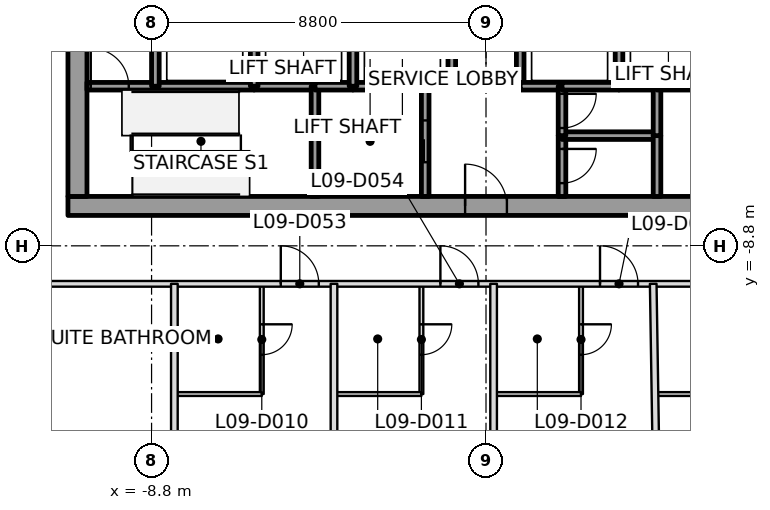
"""IFC4 building model, lengths in metres.
Left out: names, types, materials, properties, quantities, classifications, styles, units other than length and angle.
Written with IfcOpenShell. Run it as: python <this file> out.ifc"""

import sys

from ifc_helpers import new_model, si_unit, direction, frame, frame_2d, origin, place, context, subcontext, project, spatial, rectangle, extrude, element, fill, save


model = new_model("IFC4")
c1 = context("Model", 3, precision=1e-05, world=origin(), true_north=direction((0.0, 1.0)))
c2 = subcontext(c1, "Body", "Model", "MODEL_VIEW")
j1 = project(units=[si_unit("LENGTHUNIT", "METRE"), si_unit("PLANEANGLEUNIT", "RADIAN")], contexts=[c1])
p1 = place(None, origin())
s1 = spatial("IfcSite", under=j1, at=p1, CompositionType="ELEMENT")
p2 = place(p1, origin())
s2 = spatial("IfcBuilding", under=s1, at=p2, CompositionType="ELEMENT")
p3 = place(p2, frame((0.0, 0.0, 55.4)))
s3 = spatial("IfcBuildingStorey", under=s2, at=p3, CompositionType="ELEMENT", Elevation=55.4)
p4 = place(p3, frame((-11.0, -7.75, 0.0), z_axis=(0.0, 0.0, 1.0), x_axis=(1.0, 0.0, 0.0)))
e1 = element("IfcWall", 1, at=p4, inside=s3, PredefinedType="SHEAR", context=c2, shape_type="SweptSolid", body=[
    extrude(rectangle(XDim=22.0, YDim=0.5, at=frame_2d((11.0, 0.0))), origin(), (0.0, 0.0, 1.0), 3.7),
])
p5 = place(p4, frame((10.45, 0.0, 0.0)))
e2 = element("IfcOpeningElement", 2, at=p5, cuts=e1, PredefinedType="OPENING", context=c2, shape_type="SweptSolid", body=[
    extrude(rectangle(XDim=1.1, YDim=2.1, at=frame_2d((0.55, 1.05))), frame((0.0, 0.25, 0.0), z_axis=(0.0, -1.0, 0.0), x_axis=(1.0, 0.0, 0.0)), (0.0, 0.0, 1.0), 0.5),
])
p6 = place(p3, frame((-10.75, -7.5, 0.0), z_axis=(0.0, 0.0, 1.0), x_axis=(0.0, 1.0, 0.0)))
e3 = element("IfcWall", 3, at=p6, inside=s3, PredefinedType="SHEAR", context=c2, shape_type="SweptSolid", body=[
    extrude(rectangle(XDim=15.0, YDim=0.5, at=frame_2d((7.5, 0.0))), origin(), (0.0, 0.0, 1.0), 3.7),
])
p7 = place(p6, frame((6.6, 0.0, 0.0)))
e4 = element("IfcOpeningElement", 4, at=p7, cuts=e3, PredefinedType="OPENING", context=c2, shape_type="SweptSolid", body=[
    extrude(rectangle(XDim=1.8, YDim=2.1, at=frame_2d((0.9, 1.05))), frame((0.0, 0.25, 0.0), z_axis=(0.0, -1.0, 0.0), x_axis=(1.0, 0.0, 0.0)), (0.0, 0.0, 1.0), 0.5),
])
p8 = place(p3, frame((-10.5, -4.6, 0.0), z_axis=(0.0, 0.0, 1.0), x_axis=(1.0, 0.0, 0.0)))
e5 = element("IfcWall", 5, at=p8, inside=s3, PredefinedType="SOLIDWALL", context=c2, shape_type="SweptSolid", body=[
    extrude(rectangle(XDim=1.8, YDim=0.2, at=frame_2d((0.9, 0.0))), origin(), (0.0, 0.0, 1.0), 3.55),
])
p9 = place(p8, frame((0.1, 0.0, 0.0)))
e6 = element("IfcOpeningElement", 6, at=p9, cuts=e5, PredefinedType="OPENING", context=c2, shape_type="SweptSolid", body=[
    extrude(rectangle(XDim=1.0, YDim=2.1, at=frame_2d((0.5, 1.05))), frame((0.0, 0.1, 0.0), z_axis=(0.0, -1.0, 0.0), x_axis=(1.0, 0.0, 0.0)), (0.0, 0.0, 1.0), 0.2),
])
p10 = place(p3, frame((-8.7, -4.6, 0.0), z_axis=(0.0, 0.0, 1.0), x_axis=(1.0, 0.0, 0.0)))
e7 = element("IfcWall", 7, at=p10, inside=s3, PredefinedType="SOLIDWALL", context=c2, shape_type="SweptSolid", body=[
    extrude(rectangle(XDim=2.6, YDim=0.2, at=frame_2d((1.3, 0.0))), origin(), (0.0, 0.0, 1.0), 3.55),
])
p11 = place(p3, frame((-8.7, -4.6, 0.0), z_axis=(0.0, 0.0, 1.0), x_axis=(0.0, 1.0, 0.0)))
e8 = element("IfcWall", 8, at=p11, inside=s3, PredefinedType="SOLIDWALL", context=c2, shape_type="SweptSolid", body=[
    extrude(rectangle(XDim=2.8, YDim=0.2, at=frame_2d((1.4, 0.0))), origin(), (0.0, 0.0, 1.0), 3.55),
])
p12 = place(p3, frame((-6.1, -4.6, 0.0), z_axis=(0.0, 0.0, 1.0), x_axis=(1.0, 0.0, 0.0)))
e9 = element("IfcWall", 9, at=p12, inside=s3, PredefinedType="SOLIDWALL", context=c2, shape_type="SweptSolid", body=[
    extrude(rectangle(XDim=1.6, YDim=0.2, at=frame_2d((0.8, 0.0))), origin(), (0.0, 0.0, 1.0), 3.55),
])
p13 = place(p3, frame((-6.1, -4.6, 0.0), z_axis=(0.0, 0.0, 1.0), x_axis=(0.0, 1.0, 0.0)))
e10 = element("IfcWall", 10, at=p13, inside=s3, PredefinedType="SOLIDWALL", context=c2, shape_type="SweptSolid", body=[
    extrude(rectangle(XDim=2.8, YDim=0.2, at=frame_2d((1.4, 0.0))), origin(), (0.0, 0.0, 1.0), 3.55),
])
p14 = place(p3, frame((-4.5, -4.6, 0.0), z_axis=(0.0, 0.0, 1.0), x_axis=(0.0, -1.0, 0.0)))
e11 = element("IfcWall", 11, at=p14, inside=s3, PredefinedType="SOLIDWALL", context=c2, shape_type="SweptSolid", body=[
    extrude(rectangle(XDim=2.9, YDim=0.2, at=frame_2d((1.45, 0.0))), origin(), (0.0, 0.0, 1.0), 3.55),
])
p15 = place(p3, frame((-4.5, -4.6, 0.0), z_axis=(0.0, 0.0, 1.0), x_axis=(1.0, 0.0, 0.0)))
e12 = element("IfcWall", 12, at=p15, inside=s3, PredefinedType="SOLIDWALL", context=c2, shape_type="SweptSolid", body=[
    extrude(rectangle(XDim=1.0, YDim=0.2, at=frame_2d((0.5, 0.0))), origin(), (0.0, 0.0, 1.0), 3.55),
])
p16 = place(p3, frame((-3.5, -4.6, 0.0), z_axis=(0.0, 0.0, 1.0), x_axis=(1.0, 0.0, 0.0)))
e13 = element("IfcWall", 13, at=p16, inside=s3, PredefinedType="SOLIDWALL", context=c2, shape_type="SweptSolid", body=[
    extrude(rectangle(XDim=1.9, YDim=0.2, at=frame_2d((0.95, 0.0))), origin(), (0.0, 0.0, 1.0), 3.55),
])
p17 = place(p3, frame((-3.5, -4.6, 0.0), z_axis=(0.0, 0.0, 1.0), x_axis=(0.0, 1.0, 0.0)))
e14 = element("IfcWall", 14, at=p17, inside=s3, PredefinedType="SOLIDWALL", context=c2, shape_type="SweptSolid", body=[
    extrude(rectangle(XDim=2.8, YDim=0.2, at=frame_2d((1.4, 0.0))), origin(), (0.0, 0.0, 1.0), 3.55),
])
p18 = place(p3, frame((-1.6, -7.5, 0.0), z_axis=(0.0, 0.0, 1.0), x_axis=(0.0, 1.0, 0.0)))
e15 = element("IfcWall", 15, at=p18, inside=s3, PredefinedType="SOLIDWALL", context=c2, shape_type="SweptSolid", body=[
    extrude(rectangle(XDim=2.9, YDim=0.2, at=frame_2d((1.45, 0.0))), origin(), (0.0, 0.0, 1.0), 3.55),
])
p19 = place(p18, frame((0.9, 0.0, 0.0)))
e16 = element("IfcOpeningElement", 16, at=p19, cuts=e15, PredefinedType="OPENING", context=c2, shape_type="SweptSolid", body=[
    extrude(rectangle(XDim=1.1, YDim=2.1, at=frame_2d((0.55, 1.05))), frame((0.0, 0.1, 0.0), z_axis=(0.0, -1.0, 0.0), x_axis=(1.0, 0.0, 0.0)), (0.0, 0.0, 1.0), 0.2),
])
p20 = place(p3, frame((-1.6, -4.6, 0.0), z_axis=(0.0, 0.0, 1.0), x_axis=(1.0, 0.0, 0.0)))
e17 = element("IfcWall", 17, at=p20, inside=s3, PredefinedType="SOLIDWALL", context=c2, shape_type="SweptSolid", body=[
    extrude(rectangle(XDim=0.7, YDim=0.2, at=frame_2d((0.35, 0.0))), origin(), (0.0, 0.0, 1.0), 3.55),
])
for number, where, z_axis, x_axis in (
    (18, (-0.9, -4.6, 0.0), (0.0, 0.0, 1.0), (0.0, 1.0, 0.0)),
    (19, (0.9, -1.8, 0.0), (0.0, 0.0, 1.0), (0.0, -1.0, 0.0)),
):
    element("IfcWall", number, at=place(p3, frame(where, z_axis=z_axis, x_axis=x_axis)), inside=s3, PredefinedType="SOLIDWALL", context=c2, shape_type="SweptSolid", body=[
        extrude(rectangle(XDim=2.8, YDim=0.2, at=frame_2d((1.4, 0.0))), origin(), (0.0, 0.0, 1.0), 3.55),
    ])
p21 = place(p3, frame((0.9, -4.6, 0.0), z_axis=(0.0, 0.0, 1.0), x_axis=(1.0, 0.0, 0.0)))
e20 = element("IfcWall", 20, at=p21, inside=s3, PredefinedType="SOLIDWALL", context=c2, shape_type="SweptSolid", body=[
    extrude(rectangle(XDim=1.1, YDim=0.2, at=frame_2d((0.55, 0.0))), origin(), (0.0, 0.0, 1.0), 3.55),
])
p22 = place(p3, frame((2.0, -5.9, 0.0), z_axis=(0.0, 0.0, 1.0), x_axis=(0.0, -1.0, 0.0)))
e21 = element("IfcWall", 21, at=p22, inside=s3, PredefinedType="SOLIDWALL", context=c2, shape_type="SweptSolid", body=[
    extrude(rectangle(XDim=1.6, YDim=0.2, at=frame_2d((0.8, 0.0))), origin(), (0.0, 0.0, 1.0), 3.55),
])
p23 = place(p22, frame((0.35, 0.0, 0.0)))
e22 = element("IfcOpeningElement", 22, at=p23, cuts=e21, PredefinedType="OPENING", context=c2, shape_type="SweptSolid", body=[
    extrude(rectangle(XDim=0.9, YDim=2.1, at=frame_2d((0.45, 1.05))), frame((0.0, 0.1, 0.0), z_axis=(0.0, -1.0, 0.0), x_axis=(1.0, 0.0, 0.0)), (0.0, 0.0, 1.0), 0.2),
])
p24 = place(p3, frame((4.5, -5.9, 0.0), z_axis=(0.0, 0.0, 1.0), x_axis=(-1.0, 0.0, 0.0)))
e23 = element("IfcWall", 23, at=p24, inside=s3, PredefinedType="SOLIDWALL", context=c2, shape_type="SweptSolid", body=[
    extrude(rectangle(XDim=2.5, YDim=0.2, at=frame_2d((1.25, 0.0))), origin(), (0.0, 0.0, 1.0), 3.55),
])
p25 = place(p3, frame((2.0, -4.6, 0.0), z_axis=(0.0, 0.0, 1.0), x_axis=(0.0, -1.0, 0.0)))
e24 = element("IfcWall", 24, at=p25, inside=s3, PredefinedType="SOLIDWALL", context=c2, shape_type="SweptSolid", body=[
    extrude(rectangle(XDim=1.3, YDim=0.2, at=frame_2d((0.65, 0.0))), origin(), (0.0, 0.0, 1.0), 3.55),
])
p26 = place(p25, frame((0.2, 0.0, 0.0)))
e25 = element("IfcOpeningElement", 25, at=p26, cuts=e24, PredefinedType="OPENING", context=c2, shape_type="SweptSolid", body=[
    extrude(rectangle(XDim=0.9, YDim=2.1, at=frame_2d((0.45, 1.05))), frame((0.0, 0.1, 0.0), z_axis=(0.0, -1.0, 0.0), x_axis=(1.0, 0.0, 0.0)), (0.0, 0.0, 1.0), 0.2),
])
p27 = place(p3, frame((3.5, -4.6, 0.0), z_axis=(0.0, 0.0, 1.0), x_axis=(-1.0, 0.0, 0.0)))
e26 = element("IfcWall", 26, at=p27, inside=s3, PredefinedType="SOLIDWALL", context=c2, shape_type="SweptSolid", body=[
    extrude(rectangle(XDim=1.5, YDim=0.2, at=frame_2d((0.75, 0.0))), origin(), (0.0, 0.0, 1.0), 3.55),
])
p28 = place(p3, frame((4.5, -4.6, 0.0), z_axis=(0.0, 0.0, 1.0), x_axis=(-1.0, 0.0, 0.0)))
e27 = element("IfcWall", 27, at=p28, inside=s3, PredefinedType="SOLIDWALL", context=c2, shape_type="SweptSolid", body=[
    extrude(rectangle(XDim=1.0, YDim=0.2, at=frame_2d((0.5, 0.0))), origin(), (0.0, 0.0, 1.0), 3.55),
])
p29 = place(p3, frame((3.5, -4.6, 0.0), z_axis=(0.0, 0.0, 1.0), x_axis=(0.0, 1.0, 0.0)))
e28 = element("IfcWall", 28, at=p29, inside=s3, PredefinedType="SOLIDWALL", context=c2, shape_type="SweptSolid", body=[
    extrude(rectangle(XDim=2.8, YDim=0.2, at=frame_2d((1.4, 0.0))), origin(), (0.0, 0.0, 1.0), 3.55),
])
p30 = place(p3, frame((4.5, -7.5, 0.0), z_axis=(0.0, 0.0, 1.0), x_axis=(0.0, 1.0, 0.0)))
e29 = element("IfcWall", 29, at=p30, inside=s3, PredefinedType="SOLIDWALL", context=c2, shape_type="SweptSolid", body=[
    extrude(rectangle(XDim=1.6, YDim=0.2, at=frame_2d((0.8, 0.0))), origin(), (0.0, 0.0, 1.0), 3.55),
])
p31 = place(p3, frame((4.5, -5.9, 0.0), z_axis=(0.0, 0.0, 1.0), x_axis=(0.0, 1.0, 0.0)))
e30 = element("IfcWall", 30, at=p31, inside=s3, PredefinedType="SOLIDWALL", context=c2, shape_type="SweptSolid", body=[
    extrude(rectangle(XDim=1.3, YDim=0.2, at=frame_2d((0.65, 0.0))), origin(), (0.0, 0.0, 1.0), 3.55),
])
p32 = place(p3, frame((4.5, -4.6, 0.0), z_axis=(0.0, 0.0, 1.0), x_axis=(1.0, 0.0, 0.0)))
e31 = element("IfcWall", 31, at=p32, inside=s3, PredefinedType="SOLIDWALL", context=c2, shape_type="SweptSolid", body=[
    extrude(rectangle(XDim=1.6, YDim=0.2, at=frame_2d((0.8, 0.0))), origin(), (0.0, 0.0, 1.0), 3.55),
])
p33 = place(p3, frame((-8.2, -9.8, 0.0), z_axis=(0.0, 0.0, 1.0), x_axis=(0.0, -1.0, 0.0)))
e32 = element("IfcWall", 32, at=p33, inside=s3, PredefinedType="PARTITIONING", context=c2, shape_type="SweptSolid", body=[
    extrude(rectangle(XDim=14.997, YDim=0.175, at=frame_2d((7.498, 0.0))), origin(), (0.0, 0.0, 1.0), 3.0),
])
p34 = place(p3, frame((-4.0, -9.8, 0.0), z_axis=(0.0, 0.0, 1.0), x_axis=(0.0, -1.0, 0.0)))
e33 = element("IfcWall", 33, at=p34, inside=s3, PredefinedType="PARTITIONING", context=c2, shape_type="SweptSolid", body=[
    extrude(rectangle(XDim=17.715, YDim=0.175, at=frame_2d((8.857, 0.0))), origin(), (0.0, 0.0, 1.0), 2.784),
])
p35 = place(p3, frame((0.2, -9.8, 0.0), z_axis=(0.0, 0.0, 1.0), x_axis=(0.0, -1.0, 0.0)))
e34 = element("IfcWall", 34, at=p35, inside=s3, PredefinedType="PARTITIONING", context=c2, shape_type="SweptSolid", body=[
    extrude(rectangle(XDim=17.828, YDim=0.175, at=frame_2d((8.914, 0.0))), origin(), (0.0, 0.0, 1.0), 3.0),
])
p36 = place(p3, frame((4.4, -9.8, 0.0), z_axis=(0.0, 0.0, 1.0), x_axis=(0.015892742746, -0.999873702388, 0.0)))
e35 = element("IfcWall", 35, at=p36, inside=s3, PredefinedType="PARTITIONING", context=c2, shape_type="SweptSolid", body=[
    extrude(rectangle(XDim=17.297, YDim=0.175, at=frame_2d((8.649, 0.0))), origin(), (0.0, 0.0, 1.0), 2.934),
])
p37 = place(p3, frame((-12.72, -9.8, 0.0), z_axis=(0.0, 0.0, 1.0), x_axis=(1.0, 0.0, 0.0)))
e36 = element("IfcWall", 36, at=p37, inside=s3, PredefinedType="PARTITIONING", context=c2, shape_type="SweptSolid", body=[
    extrude(rectangle(XDim=25.44, YDim=0.15, at=frame_2d((12.72, 0.0))), origin(), (0.0, 0.0, 1.0), 2.797),
])
p38 = place(p37, frame((7.32, 0.0, 0.0)))
e37 = element("IfcOpeningElement", 37, at=p38, cuts=e36, PredefinedType="OPENING", context=c2, shape_type="SweptSolid", body=[
    extrude(rectangle(XDim=1.0, YDim=2.1, at=frame_2d((0.5, 1.05))), frame((0.0, 0.075, 0.0), z_axis=(0.0, -1.0, 0.0), x_axis=(1.0, 0.0, 0.0)), (0.0, 0.0, 1.0), 0.15),
])
p39 = place(p37, frame((11.52, 0.0, 0.0)))
e38 = element("IfcOpeningElement", 38, at=p39, cuts=e36, PredefinedType="OPENING", context=c2, shape_type="SweptSolid", body=[
    extrude(rectangle(XDim=1.0, YDim=2.1, at=frame_2d((0.5, 1.05))), frame((0.0, 0.075, 0.0), z_axis=(0.0, -1.0, 0.0), x_axis=(1.0, 0.0, 0.0)), (0.0, 0.0, 1.0), 0.15),
])
p40 = place(p37, frame((15.72, 0.0, 0.0)))
e39 = element("IfcOpeningElement", 39, at=p40, cuts=e36, PredefinedType="OPENING", context=c2, shape_type="SweptSolid", body=[
    extrude(rectangle(XDim=1.0, YDim=2.1, at=frame_2d((0.5, 1.05))), frame((0.0, 0.075, 0.0), z_axis=(0.0, -1.0, 0.0), x_axis=(1.0, 0.0, 0.0)), (0.0, 0.0, 1.0), 0.15),
])
p41 = place(p37, frame((19.92, 0.0, 0.0)))
e40 = element("IfcOpeningElement", 40, at=p41, cuts=e36, PredefinedType="OPENING", context=c2, shape_type="SweptSolid", body=[
    extrude(rectangle(XDim=1.0, YDim=2.1, at=frame_2d((0.5, 1.05))), frame((0.0, 0.075, 0.0), z_axis=(0.0, -1.0, 0.0), x_axis=(1.0, 0.0, 0.0)), (0.0, 0.0, 1.0), 0.15),
])
p42 = place(p3, frame((-5.9, -9.83, 0.0), z_axis=(0.0, 0.0, 1.0), x_axis=(0.0, -1.0, 0.0)))
e41 = element("IfcWall", 41, at=p42, inside=s3, PredefinedType="PARTITIONING", context=c2, shape_type="SweptSolid", body=[
    extrude(rectangle(XDim=2.87, YDim=0.1, at=frame_2d((1.435, 0.0))), origin(), (0.0, 0.0, 1.0), 3.0),
])
p43 = place(p42, frame((1.035, 0.0, 0.0)))
e42 = element("IfcOpeningElement", 42, at=p43, cuts=e41, PredefinedType="OPENING", context=c2, shape_type="SweptSolid", body=[
    extrude(rectangle(XDim=0.8, YDim=2.1, at=frame_2d((0.4, 1.05))), frame((0.0, 0.05, 0.0), z_axis=(0.0, -1.0, 0.0), x_axis=(1.0, 0.0, 0.0)), (0.0, 0.0, 1.0), 0.1),
])
p44 = place(p3, frame((-5.9, -12.7, 0.0), z_axis=(0.0, 0.0, 1.0), x_axis=(-1.0, 0.0, 0.0)))
e43 = element("IfcWall", 43, at=p44, inside=s3, PredefinedType="PARTITIONING", context=c2, shape_type="SweptSolid", body=[
    extrude(rectangle(XDim=2.27, YDim=0.1, at=frame_2d((1.135, 0.0))), origin(), (0.0, 0.0, 1.0), 2.797),
])
p45 = place(p3, frame((-1.7, -9.83, 0.0), z_axis=(0.0, 0.0, 1.0), x_axis=(0.0, -1.0, 0.0)))
e44 = element("IfcWall", 44, at=p45, inside=s3, PredefinedType="PARTITIONING", context=c2, shape_type="SweptSolid", body=[
    extrude(rectangle(XDim=2.87, YDim=0.1, at=frame_2d((1.435, 0.0))), origin(), (0.0, 0.0, 1.0), 3.0),
])
p46 = place(p45, frame((1.035, 0.0, 0.0)))
e45 = element("IfcOpeningElement", 45, at=p46, cuts=e44, PredefinedType="OPENING", context=c2, shape_type="SweptSolid", body=[
    extrude(rectangle(XDim=0.8, YDim=2.1, at=frame_2d((0.4, 1.05))), frame((0.0, 0.05, 0.0), z_axis=(0.0, -1.0, 0.0), x_axis=(1.0, 0.0, 0.0)), (0.0, 0.0, 1.0), 0.1),
])
p47 = place(p3, frame((-1.7, -12.7, 0.0), z_axis=(0.0, 0.0, 1.0), x_axis=(-1.0, 0.0, 0.0)))
e46 = element("IfcWall", 46, at=p47, inside=s3, PredefinedType="PARTITIONING", context=c2, shape_type="SweptSolid", body=[
    extrude(rectangle(XDim=2.27, YDim=0.1, at=frame_2d((1.135, 0.0))), origin(), (0.0, 0.0, 1.0), 2.947),
])
p48 = place(p3, frame((2.5, -9.83, 0.0), z_axis=(0.0, 0.0, 1.0), x_axis=(0.0, -1.0, 0.0)))
e47 = element("IfcWall", 47, at=p48, inside=s3, PredefinedType="PARTITIONING", context=c2, shape_type="SweptSolid", body=[
    extrude(rectangle(XDim=2.87, YDim=0.1, at=frame_2d((1.435, 0.0))), origin(), (0.0, 0.0, 1.0), 3.0),
])
p49 = place(p48, frame((1.035, 0.0, 0.0)))
e48 = element("IfcOpeningElement", 48, at=p49, cuts=e47, PredefinedType="OPENING", context=c2, shape_type="SweptSolid", body=[
    extrude(rectangle(XDim=0.8, YDim=2.1, at=frame_2d((0.4, 1.05))), frame((0.0, 0.05, 0.0), z_axis=(0.0, -1.0, 0.0), x_axis=(1.0, 0.0, 0.0)), (0.0, 0.0, 1.0), 0.1),
])
p50 = place(p3, frame((2.5, -12.7, 0.0), z_axis=(0.0, 0.0, 1.0), x_axis=(-1.0, 0.0, 0.0)))
e49 = element("IfcWall", 49, at=p50, inside=s3, PredefinedType="PARTITIONING", context=c2, shape_type="SweptSolid", body=[
    extrude(rectangle(XDim=2.27, YDim=0.1, at=frame_2d((1.135, 0.0))), origin(), (0.0, 0.0, 1.0), 3.0),
])
p51 = place(p3, frame((6.7, -12.7, 0.0), z_axis=(0.0, 0.0, 1.0), x_axis=(-1.0, 0.0, 0.0)))
e50 = element("IfcWall", 50, at=p51, inside=s3, PredefinedType="PARTITIONING", context=c2, shape_type="SweptSolid", body=[
    extrude(rectangle(XDim=2.27, YDim=0.1, at=frame_2d((1.135, 0.0))), origin(), (0.0, 0.0, 1.0), 2.947),
])
p52 = place(p38, origin())
e51 = element("IfcDoor", 51, at=p52, inside=s3, OperationType="SINGLE_SWING_LEFT", PredefinedType="DOOR", context=c2, shape_type="SweptSolid", body=[
    extrude(rectangle(XDim=1.0, YDim=2.1, at=frame_2d((0.5, 1.05))), frame((0.0, 0.025, 0.0), z_axis=(0.0, -1.0, 0.0), x_axis=(1.0, 0.0, 0.0)), (0.0, 0.0, 1.0), 0.05),
])
fill(e37, e51)
p53 = place(p43, origin())
e52 = element("IfcDoor", 52, at=p53, inside=s3, OperationType="SINGLE_SWING_RIGHT", PredefinedType="DOOR", context=c2, shape_type="SweptSolid", body=[
    extrude(rectangle(XDim=0.8, YDim=2.1, at=frame_2d((0.4, 1.05))), frame((0.0, 0.025, 0.0), z_axis=(0.0, -1.0, 0.0), x_axis=(1.0, 0.0, 0.0)), (0.0, 0.0, 1.0), 0.05),
])
fill(e42, e52)
p54 = place(p39, origin())
e53 = element("IfcDoor", 53, at=p54, inside=s3, OperationType="SINGLE_SWING_LEFT", PredefinedType="DOOR", context=c2, shape_type="SweptSolid", body=[
    extrude(rectangle(XDim=1.0, YDim=2.1, at=frame_2d((0.5, 1.05))), frame((0.0, 0.025, 0.0), z_axis=(0.0, -1.0, 0.0), x_axis=(1.0, 0.0, 0.0)), (0.0, 0.0, 1.0), 0.05),
])
fill(e38, e53)
p55 = place(p46, origin())
e54 = element("IfcDoor", 54, at=p55, inside=s3, OperationType="SINGLE_SWING_RIGHT", PredefinedType="DOOR", context=c2, shape_type="SweptSolid", body=[
    extrude(rectangle(XDim=0.8, YDim=2.1, at=frame_2d((0.4, 1.05))), frame((0.0, 0.025, 0.0), z_axis=(0.0, -1.0, 0.0), x_axis=(1.0, 0.0, 0.0)), (0.0, 0.0, 1.0), 0.05),
])
fill(e45, e54)
p56 = place(p40, origin())
e55 = element("IfcDoor", 55, at=p56, inside=s3, OperationType="SINGLE_SWING_LEFT", PredefinedType="DOOR", context=c2, shape_type="SweptSolid", body=[
    extrude(rectangle(XDim=1.0, YDim=2.1, at=frame_2d((0.5, 1.05))), frame((0.0, 0.025, 0.0), z_axis=(0.0, -1.0, 0.0), x_axis=(1.0, 0.0, 0.0)), (0.0, 0.0, 1.0), 0.05),
])
fill(e39, e55)
p57 = place(p49, origin())
e56 = element("IfcDoor", 56, at=p57, inside=s3, OperationType="SINGLE_SWING_LEFT", PredefinedType="DOOR", context=c2, shape_type="SweptSolid", body=[
    extrude(rectangle(XDim=0.8, YDim=2.1, at=frame_2d((0.4, 1.05))), frame((0.0, 0.025, 0.0), z_axis=(0.0, -1.0, 0.0), x_axis=(1.0, 0.0, 0.0)), (0.0, 0.0, 1.0), 0.05),
])
fill(e48, e56)
p58 = place(p19, origin())
e57 = element("IfcDoor", 57, at=p58, inside=s3, OperationType="SLIDING_TO_RIGHT", PredefinedType="DOOR", context=c2, shape_type="SweptSolid", body=[
    extrude(rectangle(XDim=1.1, YDim=2.1, at=frame_2d((0.55, 1.05))), frame((0.0, 0.025, 0.0), z_axis=(0.0, -1.0, 0.0), x_axis=(1.0, 0.0, 0.0)), (0.0, 0.0, 1.0), 0.05),
])
fill(e16, e57)
p59 = place(p9, origin())
e58 = element("IfcDoor", 58, at=p59, inside=s3, OperationType="SINGLE_SWING_LEFT", PredefinedType="DOOR", context=c2, shape_type="SweptSolid", body=[
    extrude(rectangle(XDim=1.0, YDim=2.1, at=frame_2d((0.5, 1.05))), frame((0.0, 0.025, 0.0), z_axis=(0.0, -1.0, 0.0), x_axis=(1.0, 0.0, 0.0)), (0.0, 0.0, 1.0), 0.05),
])
fill(e6, e58)
p60 = place(p23, origin())
e59 = element("IfcDoor", 59, at=p60, inside=s3, OperationType="SINGLE_SWING_LEFT", PredefinedType="DOOR", context=c2, shape_type="SweptSolid", body=[
    extrude(rectangle(XDim=0.9, YDim=2.1, at=frame_2d((0.45, 1.05))), frame((0.0, 0.025, 0.0), z_axis=(0.0, -1.0, 0.0), x_axis=(1.0, 0.0, 0.0)), (0.0, 0.0, 1.0), 0.05),
])
fill(e22, e59)
p61 = place(p26, origin())
e60 = element("IfcDoor", 60, at=p61, inside=s3, OperationType="SINGLE_SWING_RIGHT", PredefinedType="DOOR", context=c2, shape_type="SweptSolid", body=[
    extrude(rectangle(XDim=0.9, YDim=2.1, at=frame_2d((0.45, 1.05))), frame((0.0, 0.025, 0.0), z_axis=(0.0, -1.0, 0.0), x_axis=(1.0, 0.0, 0.0)), (0.0, 0.0, 1.0), 0.05),
])
fill(e25, e60)
p62 = place(p5, origin())
e61 = element("IfcDoor", 61, at=p62, inside=s3, OperationType="SINGLE_SWING_LEFT", PredefinedType="DOOR", context=c2, shape_type="SweptSolid", body=[
    extrude(rectangle(XDim=1.1, YDim=2.1, at=frame_2d((0.55, 1.05))), frame((0.0, 0.025, 0.0), z_axis=(0.0, -1.0, 0.0), x_axis=(1.0, 0.0, 0.0)), (0.0, 0.0, 1.0), 0.05),
])
fill(e2, e61)
save(model, sys.argv[1])
